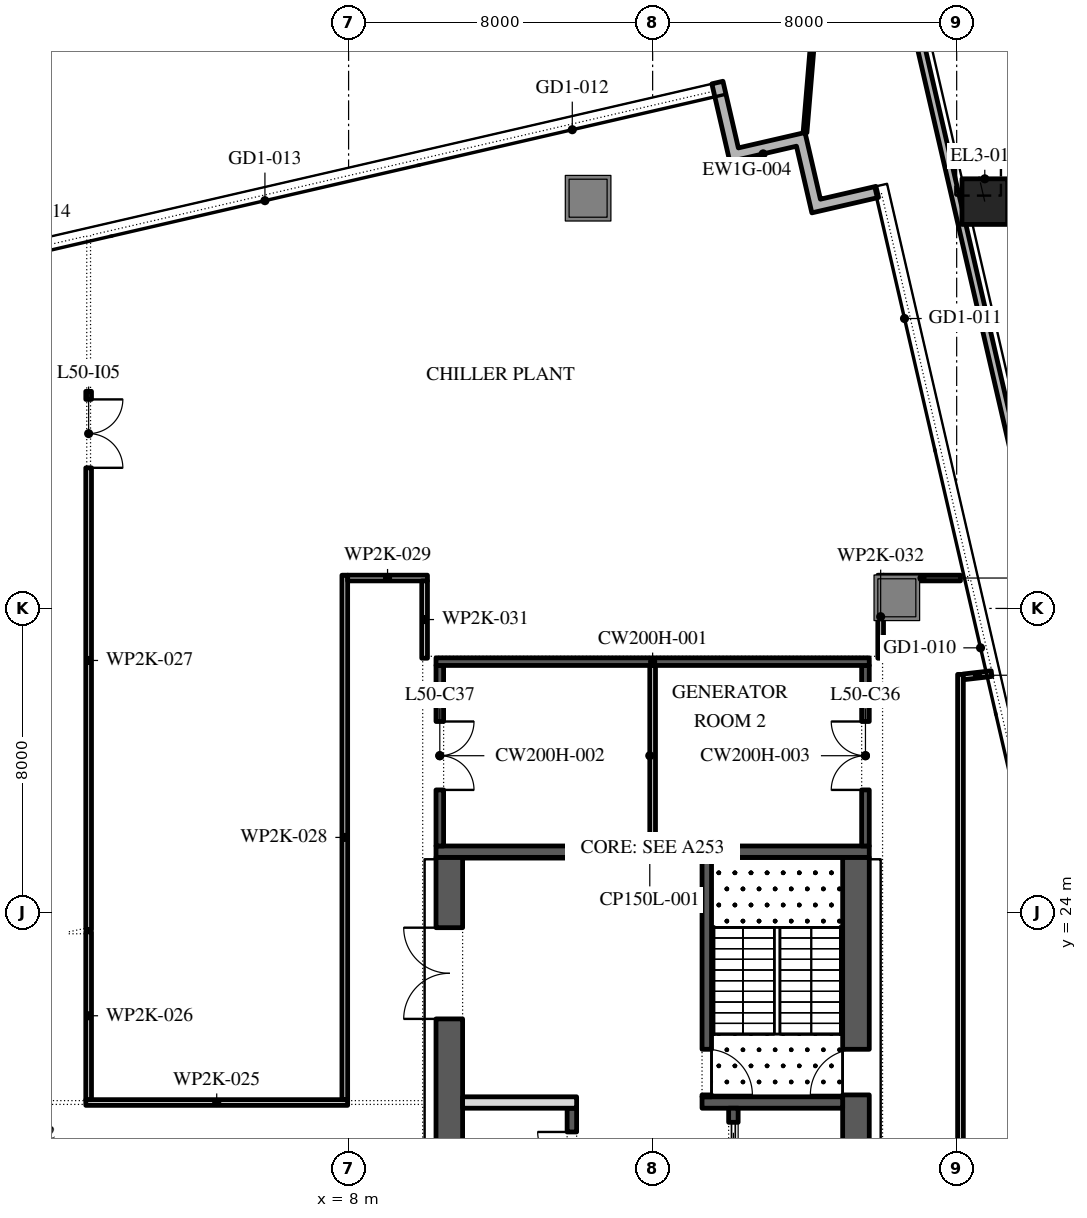
"""IFC4 building model, lengths in metres.
Left out: names, types, materials, properties, quantities, classifications, styles, units other than length and angle.
Written with IfcOpenShell. Run it as: python <this file> out.ifc"""

import sys

from ifc_helpers import new_model, si_unit, direction, frame, frame_2d, origin, origin_2d, place, context, subcontext, project, spatial, polyline, rectangle, outline, extrude, element, fill, save


model = new_model("IFC4")
c1 = context("Model", 3, precision=1e-05, world=origin(), true_north=direction((0.0, 1.0)))
c2 = subcontext(c1, "Body", "Model", "MODEL_VIEW")
j1 = project(units=[si_unit("LENGTHUNIT", "METRE"), si_unit("PLANEANGLEUNIT", "RADIAN")], contexts=[c1])
p1 = place(None, origin())
s1 = spatial("IfcSite", under=j1, at=p1, CompositionType="ELEMENT")
p2 = place(p1, origin())
s2 = spatial("IfcBuilding", under=s1, at=p2, CompositionType="ELEMENT")
p3 = place(p2, frame((0.0, 0.0, 226.2)))
s3 = spatial("IfcBuildingStorey", under=s2, at=p3, CompositionType="ELEMENT", Elevation=226.2)
p4 = place(p3, frame((24.74, 42.704, 0.0), z_axis=(-0.016143743861, 0.069986286236, 0.997417314504), x_axis=(-0.974412354627, -0.224767798297, 0.0)))
e1 = element("IfcColumn", 1, at=p4, inside=s3, PredefinedType="COLUMN", context=c2, shape_type="SweptSolid", body=[
    extrude(rectangle(XDim=1.2, YDim=1.2, at=origin_2d()), origin(), (0.0, 0.0, 1.0), 10.828),
])
p5 = place(p3, origin())
e2 = element("IfcWall", 2, at=p5, inside=s3, PredefinedType="STANDARD", context=c2, shape_type="SweptSolid", body=[
    extrude(outline(polyline([(19.785, 44.162), (18.031, 43.757), (17.558, 45.803), (17.851, 45.871), (18.256, 44.117), (20.01, 44.522), (20.414, 42.768), (21.876, 43.105), (21.943, 42.813), (20.19, 42.408), (19.785, 44.162)])), origin(), (0.0, 0.0, 1.0), 10.35),
])
p6 = place(p3, frame((35.363, -6.512, -0.05), z_axis=(0.0, 0.0, 1.0), x_axis=(-0.224952557287, 0.974369717802, 0.0)))
e3 = element("IfcWall", 3, at=p6, inside=s3, PredefinedType="STANDARD", context=c2, shape_type="SweptSolid", body=[
    extrude(rectangle(XDim=58.252, YDim=0.2, at=frame_2d((29.126, 0.0))), origin(), (0.0, 0.0, 1.0), 1.1),
])
p7 = place(p3, frame((17.867, 52.825, -0.05), z_axis=(0.0, 0.0, 1.0), x_axis=(-0.974369750752, -0.224952414565, 0.0)))
e4 = element("IfcWall", 4, at=p7, inside=s3, PredefinedType="STANDARD", context=c2, shape_type="SweptSolid", body=[
    extrude(rectangle(XDim=53.16, YDim=0.2, at=frame_2d((26.58, 0.0))), origin(), (0.0, 0.0, 1.0), 1.1),
])
p8 = place(p3, frame((20.01, 44.522, -0.05), z_axis=(0.0, 0.0, 1.0), x_axis=(0.08298774158, 0.996550568083, 0.0)))
e5 = element("IfcWall", 5, at=p8, inside=s3, PredefinedType="STANDARD", context=c2, shape_type="SweptSolid", body=[
    extrude(rectangle(XDim=6.999, YDim=0.1, at=frame_2d((3.5, 0.0))), origin(), (0.0, 0.0, 1.0), 10.4),
])
p9 = place(p3, frame((21.35, -2.45, 0.0), z_axis=(0.0, 0.0, 1.0), x_axis=(0.0, 1.0, 0.0)))
e6 = element("IfcWall", 6, at=p9, inside=s3, PredefinedType="SHEAR", context=c2, shape_type="SweptSolid", body=[
    extrude(rectangle(XDim=27.9, YDim=0.7, at=frame_2d((13.95, 0.0))), origin(), (0.0, 0.0, 1.0), 10.35),
])
p10 = place(p9, frame((5.05, 0.0, 0.0)))
e7 = element("IfcOpeningElement", 7, at=p10, cuts=e6, PredefinedType="OPENING", context=c2, shape_type="SweptSolid", body=[
    extrude(rectangle(XDim=1.2, YDim=2.1, at=frame_2d((0.6, 1.05))), frame((0.0, 0.36, 0.0), z_axis=(0.0, -1.0, 0.0), x_axis=(1.0, 0.0, 0.0)), (0.0, 0.0, 1.0), 0.72),
])
p11 = place(p9, frame((21.65, 0.0, 0.0)))
e8 = element("IfcOpeningElement", 8, at=p11, cuts=e6, PredefinedType="OPENING", context=c2, shape_type="SweptSolid", body=[
    extrude(rectangle(XDim=1.2, YDim=2.1, at=frame_2d((0.6, 1.05))), frame((0.0, 0.36, 0.0), z_axis=(0.0, -1.0, 0.0), x_axis=(1.0, 0.0, 0.0)), (0.0, 0.0, 1.0), 0.72),
])
p12 = place(p3, frame((10.65, -2.45, 0.0), z_axis=(0.0, 0.0, 1.0), x_axis=(0.0, 1.0, 0.0)))
e9 = element("IfcWall", 9, at=p12, inside=s3, PredefinedType="SHEAR", context=c2, shape_type="SweptSolid", body=[
    extrude(rectangle(XDim=27.9, YDim=0.7, at=frame_2d((13.95, 0.0))), origin(), (0.0, 0.0, 1.0), 10.35),
])
p13 = place(p12, frame((23.65, 0.0, 0.0)))
e10 = element("IfcOpeningElement", 10, at=p13, cuts=e9, PredefinedType="OPENING", context=c2, shape_type="SweptSolid", body=[
    extrude(rectangle(XDim=2.4, YDim=2.1, at=frame_2d((1.2, 1.05))), frame((0.0, 0.36, 0.0), z_axis=(0.0, -1.0, 0.0), x_axis=(1.0, 0.0, 0.0)), (0.0, 0.0, 1.0), 0.72),
])
p14 = place(p12, frame((0.637, 0.0, 0.0)))
e11 = element("IfcOpeningElement", 11, at=p14, cuts=e9, PredefinedType="OPENING", context=c2, shape_type="SweptSolid", body=[
    extrude(rectangle(XDim=1.8, YDim=2.4, at=frame_2d((0.9, 1.2))), frame((0.0, 0.36, 0.0), z_axis=(0.0, -1.0, 0.0), x_axis=(1.0, 0.0, 0.0)), (0.0, 0.0, 1.0), 0.72),
])
p15 = place(p12, frame((3.863, 0.0, 0.0)))
e12 = element("IfcOpeningElement", 12, at=p15, cuts=e9, PredefinedType="OPENING", context=c2, shape_type="SweptSolid", body=[
    extrude(rectangle(XDim=1.8, YDim=2.4, at=frame_2d((0.9, 1.2))), frame((0.0, 0.36, 0.0), z_axis=(0.0, -1.0, 0.0), x_axis=(1.0, 0.0, 0.0)), (0.0, 0.0, 1.0), 0.72),
])
p16 = place(p3, frame((10.3, 25.6, 0.0), z_axis=(0.0, 0.0, 1.0), x_axis=(1.0, 0.0, 0.0)))
e13 = element("IfcWall", 13, at=p16, inside=s3, PredefinedType="SHEAR", context=c2, shape_type="SweptSolid", body=[
    extrude(rectangle(XDim=11.4, YDim=0.3, at=frame_2d((5.7, 0.0))), origin(), (0.0, 0.0, 1.0), 10.35),
])
p17 = place(p3, frame((17.3, 19.0, 0.0), z_axis=(0.0, 0.0, 1.0), x_axis=(1.0, 0.0, 0.0)))
e14 = element("IfcWall", 14, at=p17, inside=s3, PredefinedType="SHEAR", context=c2, shape_type="SweptSolid", body=[
    extrude(rectangle(XDim=3.7, YDim=0.3, at=frame_2d((1.85, 0.0))), origin(), (0.0, 0.0, 1.0), 10.35),
])
p18 = place(p3, frame((17.425, 19.15, 0.0), z_axis=(0.0, 0.0, 1.0), x_axis=(0.0, 1.0, 0.0)))
e15 = element("IfcWall", 15, at=p18, inside=s3, PredefinedType="SHEAR", context=c2, shape_type="SweptSolid", body=[
    extrude(rectangle(XDim=6.3, YDim=0.25, at=frame_2d((3.15, 0.0))), origin(), (0.0, 0.0, 1.0), 10.35),
])
p19 = place(p18, frame((0.05, 0.0, 0.0)))
e16 = element("IfcOpeningElement", 16, at=p19, cuts=e15, PredefinedType="OPENING", context=c2, shape_type="SweptSolid", body=[
    extrude(rectangle(XDim=1.2, YDim=2.1, at=frame_2d((0.6, 1.05))), frame((0.0, 0.135, 0.0), z_axis=(0.0, -1.0, 0.0), x_axis=(1.0, 0.0, 0.0)), (0.0, 0.0, 1.0), 0.27),
])
p20 = place(p3, frame((18.125, 4.15, 0.0), z_axis=(0.0, 0.0, 1.0), x_axis=(0.0, 1.0, 0.0)))
e17 = element("IfcWall", 17, at=p20, inside=s3, PredefinedType="SHEAR", context=c2, shape_type="SweptSolid", body=[
    extrude(rectangle(XDim=14.7, YDim=0.25, at=frame_2d((7.35, 0.0))), origin(), (0.0, 0.0, 1.0), 10.35),
])
p21 = place(p20, frame((2.796, 0.0, 0.0)))
e18 = element("IfcOpeningElement", 18, at=p21, cuts=e17, PredefinedType="OPENING", context=c2, shape_type="SweptSolid", body=[
    extrude(rectangle(XDim=1.8, YDim=2.4, at=frame_2d((0.9, 1.2))), frame((0.0, 0.135, 0.0), z_axis=(0.0, -1.0, 0.0), x_axis=(1.0, 0.0, 0.0)), (0.0, 0.0, 1.0), 0.27),
])
p22 = place(p20, frame((8.004, 0.0, 0.0)))
e19 = element("IfcOpeningElement", 19, at=p22, cuts=e17, PredefinedType="OPENING", context=c2, shape_type="SweptSolid", body=[
    extrude(rectangle(XDim=1.8, YDim=2.4, at=frame_2d((0.9, 1.2))), frame((0.0, 0.135, 0.0), z_axis=(0.0, -1.0, 0.0), x_axis=(1.0, 0.0, 0.0)), (0.0, 0.0, 1.0), 0.27),
])
p23 = place(p20, frame((0.371, 0.0, 0.0)))
e20 = element("IfcOpeningElement", 20, at=p23, cuts=e17, PredefinedType="OPENING", context=c2, shape_type="SweptSolid", body=[
    extrude(rectangle(XDim=1.1, YDim=2.1, at=frame_2d((0.55, 1.05))), frame((0.0, 0.135, 0.0), z_axis=(0.0, -1.0, 0.0), x_axis=(1.0, 0.0, 0.0)), (0.0, 0.0, 1.0), 0.27),
])
p24 = place(p20, frame((13.229, 0.0, 0.0)))
e21 = element("IfcOpeningElement", 21, at=p24, cuts=e17, PredefinedType="OPENING", context=c2, shape_type="SweptSolid", body=[
    extrude(rectangle(XDim=1.1, YDim=2.1, at=frame_2d((0.55, 1.05))), frame((0.0, 0.135, 0.0), z_axis=(0.0, -1.0, 0.0), x_axis=(1.0, 0.0, 0.0)), (0.0, 0.0, 1.0), 0.27),
])
p25 = place(p3, frame((13.875, -2.45, 0.0), z_axis=(0.0, 0.0, 1.0), x_axis=(0.0, 1.0, 0.0)))
e22 = element("IfcWall", 22, at=p25, inside=s3, PredefinedType="SHEAR", context=c2, shape_type="SweptSolid", body=[
    extrude(rectangle(XDim=21.3, YDim=0.25, at=frame_2d((10.65, 0.0))), origin(), (0.0, 0.0, 1.0), 10.35),
])
p26 = place(p25, frame((15.811, 0.0, 0.0)))
e23 = element("IfcOpeningElement", 23, at=p26, cuts=e22, PredefinedType="OPENING", context=c2, shape_type="SweptSolid", body=[
    extrude(rectangle(XDim=1.8, YDim=2.4, at=frame_2d((0.9, 1.2))), frame((0.0, 0.135, 0.0), z_axis=(0.0, -1.0, 0.0), x_axis=(1.0, 0.0, 0.0)), (0.0, 0.0, 1.0), 0.27),
])
p27 = place(p25, frame((18.875, 0.0, 0.0)))
e24 = element("IfcOpeningElement", 24, at=p27, cuts=e22, PredefinedType="OPENING", context=c2, shape_type="SweptSolid", body=[
    extrude(rectangle(XDim=1.8, YDim=2.4, at=frame_2d((0.9, 1.2))), frame((0.0, 0.135, 0.0), z_axis=(0.0, -1.0, 0.0), x_axis=(1.0, 0.0, 0.0)), (0.0, 0.0, 1.0), 0.27),
])
p28 = place(p25, frame((6.971, 0.0, 0.0)))
e25 = element("IfcOpeningElement", 25, at=p28, cuts=e22, PredefinedType="OPENING", context=c2, shape_type="SweptSolid", body=[
    extrude(rectangle(XDim=1.1, YDim=2.1, at=frame_2d((0.55, 1.05))), frame((0.0, 0.135, 0.0), z_axis=(0.0, -1.0, 0.0), x_axis=(1.0, 0.0, 0.0)), (0.0, 0.0, 1.0), 0.27),
])
p29 = place(p25, frame((9.114, 0.0, 0.0)))
e26 = element("IfcOpeningElement", 26, at=p29, cuts=e22, PredefinedType="OPENING", context=c2, shape_type="SweptSolid", body=[
    extrude(rectangle(XDim=1.1, YDim=2.1, at=frame_2d((0.55, 1.05))), frame((0.0, 0.135, 0.0), z_axis=(0.0, -1.0, 0.0), x_axis=(1.0, 0.0, 0.0)), (0.0, 0.0, 1.0), 0.27),
])
p30 = place(p25, frame((11.257, 0.0, 0.0)))
e27 = element("IfcOpeningElement", 27, at=p30, cuts=e22, PredefinedType="OPENING", context=c2, shape_type="SweptSolid", body=[
    extrude(rectangle(XDim=1.1, YDim=2.1, at=frame_2d((0.55, 1.05))), frame((0.0, 0.135, 0.0), z_axis=(0.0, -1.0, 0.0), x_axis=(1.0, 0.0, 0.0)), (0.0, 0.0, 1.0), 0.27),
])
p31 = place(p25, frame((13.4, 0.0, 0.0)))
e28 = element("IfcOpeningElement", 28, at=p31, cuts=e22, PredefinedType="OPENING", context=c2, shape_type="SweptSolid", body=[
    extrude(rectangle(XDim=1.1, YDim=2.1, at=frame_2d((0.55, 1.05))), frame((0.0, 0.135, 0.0), z_axis=(0.0, -1.0, 0.0), x_axis=(1.0, 0.0, 0.0)), (0.0, 0.0, 1.0), 0.27),
])
p32 = place(p3, frame((11.0, 19.0, 0.0), z_axis=(0.0, 0.0, 1.0), x_axis=(1.0, 0.0, 0.0)))
e29 = element("IfcWall", 29, at=p32, inside=s3, PredefinedType="PARTITIONING", context=c2, shape_type="SweptSolid", body=[
    extrude(rectangle(XDim=3.0, YDim=0.3, at=frame_2d((1.5, 0.0))), origin(), (0.0, 0.0, 1.0), 10.35),
])
p33 = place(p3, frame((21.6, 25.75, 0.0), z_axis=(0.0, 0.0, 1.0), x_axis=(0.0, 1.0, 0.0)))
e30 = element("IfcWall", 30, at=p33, inside=s3, PredefinedType="SHEAR", context=c2, shape_type="SweptSolid", body=[
    extrude(rectangle(XDim=4.75, YDim=0.2, at=frame_2d((2.375, 0.0))), origin(), (0.0, 0.0, 1.0), 10.35),
])
p34 = place(p33, frame((1.475, 0.0, 0.0)))
e31 = element("IfcOpeningElement", 31, at=p34, cuts=e30, PredefinedType="OPENING", context=c2, shape_type="SweptSolid", body=[
    extrude(rectangle(XDim=1.8, YDim=2.4, at=frame_2d((0.9, 1.2))), frame((0.0, 0.11, 0.0), z_axis=(0.0, -1.0, 0.0), x_axis=(1.0, 0.0, 0.0)), (0.0, 0.0, 1.0), 0.22),
])
p35 = place(p3, frame((10.4, 25.75, 0.0), z_axis=(0.0, 0.0, 1.0), x_axis=(0.0, 1.0, 0.0)))
e32 = element("IfcWall", 32, at=p35, inside=s3, PredefinedType="SHEAR", context=c2, shape_type="SweptSolid", body=[
    extrude(rectangle(XDim=4.75, YDim=0.2, at=frame_2d((2.375, 0.0))), origin(), (0.0, 0.0, 1.0), 10.35),
])
p36 = place(p35, frame((1.475, 0.0, 0.0)))
e33 = element("IfcOpeningElement", 33, at=p36, cuts=e32, PredefinedType="OPENING", context=c2, shape_type="SweptSolid", body=[
    extrude(rectangle(XDim=1.8, YDim=2.4, at=frame_2d((0.9, 1.2))), frame((0.0, 0.11, 0.0), z_axis=(0.0, -1.0, 0.0), x_axis=(1.0, 0.0, 0.0)), (0.0, 0.0, 1.0), 0.22),
])
p37 = place(p3, frame((10.3, 30.6, 0.0), z_axis=(0.0, 0.0, 1.0), x_axis=(1.0, 0.0, 0.0)))
e34 = element("IfcWall", 34, at=p37, inside=s3, PredefinedType="SHEAR", context=c2, shape_type="SweptSolid", body=[
    extrude(rectangle(XDim=11.4, YDim=0.2, at=frame_2d((5.7, 0.0))), origin(), (0.0, 0.0, 1.0), 10.35),
])
p38 = place(p3, frame((16.0, 25.75, 0.0), z_axis=(0.0, 0.0, 1.0), x_axis=(0.0, 1.0, 0.0)))
e35 = element("IfcWall", 35, at=p38, inside=s3, PredefinedType="PARTITIONING", context=c2, shape_type="SweptSolid", body=[
    extrude(rectangle(XDim=4.75, YDim=0.15, at=frame_2d((2.375, 0.0))), origin(), (0.0, 0.0, 1.0), 10.35),
])
p39 = place(p3, frame((1.085, 19.0, 0.0), z_axis=(0.0, 0.0, 1.0), x_axis=(1.0, 0.0, 0.0)))
e36 = element("IfcWall", 36, at=p39, inside=s3, PredefinedType="PARTITIONING", context=c2, shape_type="SweptSolid", body=[
    extrude(rectangle(XDim=6.89, YDim=0.15, at=frame_2d((3.445, 0.0))), origin(), (0.0, 0.0, 1.0), 10.35),
])
p40 = place(p3, frame((1.16, 23.49, 0.0), z_axis=(0.0, 0.0, 1.0), x_axis=(0.0, -1.0, 0.0)))
e37 = element("IfcWall", 37, at=p40, inside=s3, PredefinedType="PARTITIONING", context=c2, shape_type="SweptSolid", body=[
    extrude(rectangle(XDim=4.415, YDim=0.15, at=frame_2d((2.208, 0.0))), origin(), (0.0, 0.0, 1.0), 10.35),
])
p41 = place(p3, frame((1.16, 37.712, 0.0), z_axis=(0.0, 0.0, 1.0), x_axis=(0.0, -1.0, 0.0)))
e38 = element("IfcWall", 38, at=p41, inside=s3, PredefinedType="PARTITIONING", context=c2, shape_type="SweptSolid", body=[
    extrude(rectangle(XDim=14.162, YDim=0.15, at=frame_2d((7.081, 0.0))), origin(), (0.0, 0.0, 1.0), 10.35),
])
p42 = place(p41, frame((0.212, 0.0, 0.0)))
e39 = element("IfcOpeningElement", 39, at=p42, cuts=e38, PredefinedType="OPENING", context=c2, shape_type="SweptSolid", body=[
    extrude(rectangle(XDim=1.8, YDim=2.1, at=frame_2d((0.9, 1.05))), frame((0.0, 0.085, 0.0), z_axis=(0.0, -1.0, 0.0), x_axis=(1.0, 0.0, 0.0)), (0.0, 0.0, 1.0), 0.17),
])
p43 = place(p3, frame((7.9, 19.075, 0.0), z_axis=(0.0, 0.0, 1.0), x_axis=(0.0, 1.0, 0.0)))
e40 = element("IfcWall", 40, at=p43, inside=s3, PredefinedType="PARTITIONING", context=c2, shape_type="SweptSolid", body=[
    extrude(rectangle(XDim=13.8, YDim=0.15, at=frame_2d((6.9, 0.0))), origin(), (0.0, 0.0, 1.0), 10.35),
])
p44 = place(p3, frame((7.975, 32.8, 0.0), z_axis=(0.0, 0.0, 1.0), x_axis=(1.0, 0.0, 0.0)))
e41 = element("IfcWall", 41, at=p44, inside=s3, PredefinedType="PARTITIONING", context=c2, shape_type="SweptSolid", body=[
    extrude(rectangle(XDim=2.1, YDim=0.15, at=frame_2d((1.05, 0.0))), origin(), (0.0, 0.0, 1.0), 10.35),
])
p45 = place(p3, frame((10.0, 32.725, 0.0), z_axis=(0.0, 0.0, 1.0), x_axis=(0.0, -1.0, 0.0)))
e42 = element("IfcWall", 42, at=p45, inside=s3, PredefinedType="PARTITIONING", context=c2, shape_type="SweptSolid", body=[
    extrude(rectangle(XDim=2.035, YDim=0.15, at=frame_2d((1.018, 0.0))), origin(), (0.0, 0.0, 1.0), 10.35),
])
p46 = place(p3, frame((22.0, 30.69, 0.0), z_axis=(0.0, 0.0, 1.0), x_axis=(0.0, 1.0, 0.0)))
e43 = element("IfcWall", 43, at=p46, inside=s3, PredefinedType="PARTITIONING", context=c2, shape_type="SweptSolid", body=[
    extrude(rectangle(XDim=2.185, YDim=0.15, at=frame_2d((1.093, 0.0))), origin(), (0.0, 0.0, 1.0), 10.35),
])
p47 = place(p3, frame((22.075, 32.8, 0.0), z_axis=(0.0, 0.0, 1.0), x_axis=(1.0, 0.0, 0.0)))
e44 = element("IfcWall", 44, at=p47, inside=s3, PredefinedType="PARTITIONING", context=c2, shape_type="SweptSolid", body=[
    extrude(rectangle(XDim=2.025, YDim=0.15, at=frame_2d((1.013, 0.0))), origin(), (0.0, 0.0, 1.0), 10.35),
])
p48 = place(p3, frame((24.1, 30.265, 0.0), z_axis=(0.0, 0.0, 1.0), x_axis=(0.0, -1.0, 0.0)))
e45 = element("IfcWall", 45, at=p48, inside=s3, PredefinedType="PARTITIONING", context=c2, shape_type="SweptSolid", body=[
    extrude(rectangle(XDim=35.19, YDim=0.15, at=frame_2d((17.595, 0.0))), origin(), (0.0, 0.0, 1.0), 10.35),
])
p49 = place(p48, frame((23.815, 0.0, 0.0)))
e46 = element("IfcOpeningElement", 46, at=p49, cuts=e45, PredefinedType="OPENING", context=c2, shape_type="SweptSolid", body=[
    extrude(rectangle(XDim=1.8, YDim=2.1, at=frame_2d((0.9, 1.05))), frame((0.0, 0.085, 0.0), z_axis=(0.0, -1.0, 0.0), x_axis=(1.0, 0.0, 0.0)), (0.0, 0.0, 1.0), 0.17),
])
p50 = place(p3, frame((24.918, 30.285, 0.0), z_axis=(0.0, 0.0, 1.0), x_axis=(-0.99339322031, -0.114760227617, 0.0)))
e47 = element("IfcWall", 47, at=p50, inside=s3, PredefinedType="PARTITIONING", context=c2, shape_type="SweptSolid", body=[
    extrude(rectangle(XDim=0.749, YDim=0.15, at=frame_2d((0.375, 0.0))), origin(), (0.0, 0.0, 1.0), 10.35),
])
p51 = place(p24, origin())
e48 = element("IfcDoor", 48, at=p51, inside=s3, OperationType="SLIDING_TO_LEFT", PredefinedType="DOOR", context=c2, shape_type="SweptSolid", body=[
    extrude(rectangle(XDim=1.1, YDim=2.1, at=frame_2d((0.55, 1.05))), frame((0.0, 0.025, 0.0), z_axis=(0.0, -1.0, 0.0), x_axis=(1.0, 0.0, 0.0)), (0.0, 0.0, 1.0), 0.05),
])
fill(e21, e48)
p52 = place(p27, origin())
e49 = element("IfcDoor", 49, at=p52, inside=s3, OperationType="DOUBLE_DOOR_SINGLE_SWING", PredefinedType="DOOR", context=c2, shape_type="SweptSolid", body=[
    extrude(rectangle(XDim=1.8, YDim=2.4, at=frame_2d((0.9, 1.2))), frame((0.0, 0.125, 0.0), z_axis=(0.0, -1.0, 0.0), x_axis=(1.0, 0.0, 0.0)), (0.0, 0.0, 1.0), 0.05),
])
fill(e24, e49)
p53 = place(p13, origin())
e50 = element("IfcDoor", 50, at=p53, inside=s3, OperationType="DOUBLE_DOOR_SINGLE_SWING", PredefinedType="DOOR", context=c2, shape_type="SweptSolid", body=[
    extrude(rectangle(XDim=2.4, YDim=2.1, at=frame_2d((1.2, 1.05))), frame((0.0, 0.025, 0.0), z_axis=(0.0, -1.0, 0.0), x_axis=(1.0, 0.0, 0.0)), (0.0, 0.0, 1.0), 0.05),
])
fill(e10, e50)
p54 = place(p19, frame((1.2, 0.0, 0.0), z_axis=(0.0, 0.0, 1.0), x_axis=(-1.0, 0.0, 0.0)))
e51 = element("IfcDoor", 51, at=p54, inside=s3, OperationType="SINGLE_SWING_LEFT", PredefinedType="DOOR", context=c2, shape_type="SweptSolid", body=[
    extrude(rectangle(XDim=1.2, YDim=2.1, at=frame_2d((0.6, 1.05))), frame((0.0, 0.025, 0.0), z_axis=(0.0, -1.0, 0.0), x_axis=(1.0, 0.0, 0.0)), (0.0, 0.0, 1.0), 0.05),
])
fill(e16, e51)
p55 = place(p11, origin())
e52 = element("IfcDoor", 52, at=p55, inside=s3, OperationType="SINGLE_SWING_RIGHT", PredefinedType="DOOR", context=c2, shape_type="SweptSolid", body=[
    extrude(rectangle(XDim=1.2, YDim=2.1, at=frame_2d((0.6, 1.05))), frame((0.0, 0.025, 0.0), z_axis=(0.0, -1.0, 0.0), x_axis=(1.0, 0.0, 0.0)), (0.0, 0.0, 1.0), 0.05),
])
fill(e8, e52)
p56 = place(p34, origin())
e53 = element("IfcDoor", 53, at=p56, inside=s3, OperationType="DOUBLE_DOOR_SINGLE_SWING", PredefinedType="DOOR", context=c2, shape_type="SweptSolid", body=[
    extrude(rectangle(XDim=1.8, YDim=2.4, at=frame_2d((0.9, 1.2))), frame((0.0, 0.1, 0.0), z_axis=(0.0, -1.0, 0.0), x_axis=(1.0, 0.0, 0.0)), (0.0, 0.0, 1.0), 0.05),
])
fill(e31, e53)
p57 = place(p36, frame((1.8, -0.15, 0.0), z_axis=(0.0, 0.0, 1.0), x_axis=(-1.0, 0.0, 0.0)))
e54 = element("IfcDoor", 54, at=p57, inside=s3, OperationType="DOUBLE_DOOR_SINGLE_SWING", PredefinedType="DOOR", context=c2, shape_type="SweptSolid", body=[
    extrude(rectangle(XDim=1.8, YDim=2.4, at=frame_2d((0.9, 1.2))), frame((0.0, -0.05, 0.0), z_axis=(0.0, -1.0, 0.0), x_axis=(1.0, 0.0, 0.0)), (0.0, 0.0, 1.0), 0.05),
])
fill(e33, e54)
p58 = place(p42, origin())
e55 = element("IfcDoor", 55, at=p58, inside=s3, OperationType="SINGLE_SWING_LEFT", PredefinedType="DOOR", context=c2, shape_type="SweptSolid", body=[
    extrude(rectangle(XDim=1.8, YDim=2.1, at=frame_2d((0.9, 1.05))), frame((0.0, 0.025, 0.0), z_axis=(0.0, -1.0, 0.0), x_axis=(1.0, 0.0, 0.0)), (0.0, 0.0, 1.0), 0.05),
])
fill(e39, e55)
save(model, sys.argv[1])
